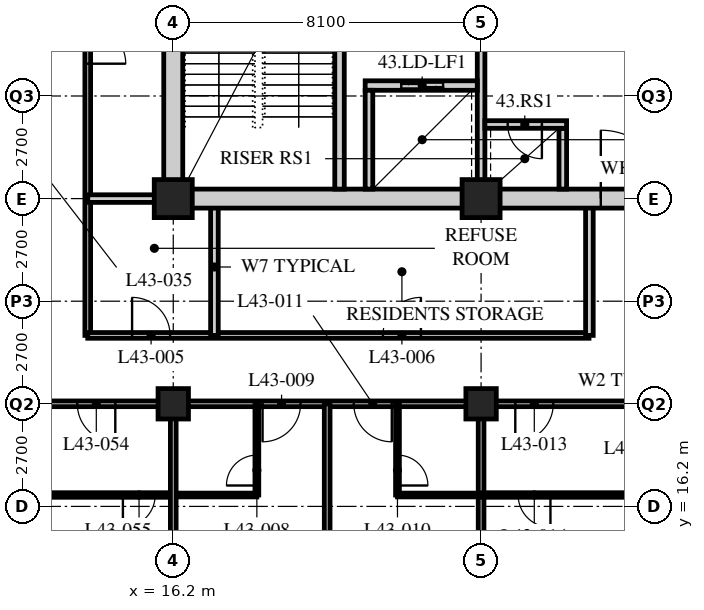
"""IFC4 building model, lengths in metres.
Left out: names, types, materials, properties, quantities, classifications, styles, units other than length and angle.
Written with IfcOpenShell. Run it as: python <this file> out.ifc"""

import sys

from ifc_helpers import new_model, si_unit, direction, frame, frame_2d, origin, origin_2d, place, context, subcontext, project, spatial, rectangle, hollow_rectangle, extrude, element, fill, save


model = new_model("IFC4")
c1 = context("Model", 3, precision=1e-05, world=origin(), true_north=direction((0.0, 1.0)))
c2 = subcontext(c1, "Body", "Model", "MODEL_VIEW")
j1 = project(units=[si_unit("LENGTHUNIT", "METRE"), si_unit("PLANEANGLEUNIT", "RADIAN")], contexts=[c1])
p1 = place(None, origin())
s1 = spatial("IfcSite", under=j1, at=p1, CompositionType="ELEMENT")
p2 = place(p1, origin())
s2 = spatial("IfcBuilding", under=s1, at=p2, CompositionType="ELEMENT")
p3 = place(p2, frame((0.0, 0.0, 170.4)))
s3 = spatial("IfcBuildingStorey", under=s2, at=p3, CompositionType="ELEMENT", Elevation=170.4)
p4 = place(p3, frame((16.2, 18.9, 0.0), z_axis=(0.0, 0.0, 1.0), x_axis=(1.0, 0.0, 0.0)))
e1 = element("IfcColumn", 1, at=p4, inside=s3, PredefinedType="COLUMN", context=c2, shape_type="SweptSolid", body=[
    extrude(hollow_rectangle(XDim=0.8, YDim=0.8, WallThickness=0.08, at=origin_2d()), origin(), (0.0, 0.0, 1.0), 3.6),
])
p5 = place(p3, frame((16.2, 24.3, 0.0), z_axis=(0.0, 0.0, 1.0), x_axis=(1.0, 0.0, 0.0)))
e2 = element("IfcColumn", 2, at=p5, inside=s3, PredefinedType="COLUMN", context=c2, shape_type="SweptSolid", body=[
    extrude(hollow_rectangle(XDim=1.0, YDim=1.0, WallThickness=0.1, at=origin_2d()), origin(), (0.0, 0.0, 1.0), 3.6),
])
p6 = place(p3, frame((24.3, 18.9, 0.0), z_axis=(0.0, 0.0, 1.0), x_axis=(1.0, 0.0, 0.0)))
e3 = element("IfcColumn", 3, at=p6, inside=s3, PredefinedType="COLUMN", context=c2, shape_type="SweptSolid", body=[
    extrude(hollow_rectangle(XDim=0.8, YDim=0.8, WallThickness=0.08, at=origin_2d()), origin(), (0.0, 0.0, 1.0), 3.6),
])
p7 = place(p3, frame((24.3, 24.3, 0.0), z_axis=(0.0, 0.0, 1.0), x_axis=(1.0, 0.0, 0.0)))
e4 = element("IfcColumn", 4, at=p7, inside=s3, PredefinedType="COLUMN", context=c2, shape_type="SweptSolid", body=[
    extrude(hollow_rectangle(XDim=1.0, YDim=1.0, WallThickness=0.1, at=origin_2d()), origin(), (0.0, 0.0, 1.0), 3.6),
])
p8 = place(p3, frame((12.15, 18.9, 0.0), z_axis=(0.0, 0.0, 1.0), x_axis=(1.0, 0.0, 0.0)))
e5 = element("IfcWall", 5, at=p8, inside=s3, PredefinedType="PARTITIONING", context=c2, shape_type="SweptSolid", body=[
    extrude(rectangle(XDim=32.4, YDim=0.15, at=frame_2d((16.2, 0.0))), origin(), (0.0, 0.0, 1.0), 2.778),
])
p9 = place(p8, frame((6.4, 0.0, 0.0)))
e6 = element("IfcOpeningElement", 6, at=p9, cuts=e5, PredefinedType="OPENING", context=c2, shape_type="SweptSolid", body=[
    extrude(rectangle(XDim=1.0, YDim=2.1, at=frame_2d((0.5, 1.05))), frame((0.0, 0.085, 0.0), z_axis=(0.0, -1.0, 0.0), x_axis=(1.0, 0.0, 0.0)), (0.0, 0.0, 1.0), 0.17),
])
p10 = place(p8, frame((8.8, 0.0, 0.0)))
e7 = element("IfcOpeningElement", 7, at=p10, cuts=e5, PredefinedType="OPENING", context=c2, shape_type="SweptSolid", body=[
    extrude(rectangle(XDim=1.0, YDim=2.1, at=frame_2d((0.5, 1.05))), frame((0.0, 0.085, 0.0), z_axis=(0.0, -1.0, 0.0), x_axis=(1.0, 0.0, 0.0)), (0.0, 0.0, 1.0), 0.17),
])
p11 = place(p8, frame((13.05, 0.0, 0.0)))
e8 = element("IfcOpeningElement", 8, at=p11, cuts=e5, PredefinedType="OPENING", context=c2, shape_type="SweptSolid", body=[
    extrude(rectangle(XDim=1.0, YDim=2.1, at=frame_2d((0.5, 1.05))), frame((0.0, 0.085, 0.0), z_axis=(0.0, -1.0, 0.0), x_axis=(1.0, 0.0, 0.0)), (0.0, 0.0, 1.0), 0.17),
])
p12 = place(p8, frame((22.6, 0.0, 0.0)))
e9 = element("IfcOpeningElement", 9, at=p12, cuts=e5, PredefinedType="OPENING", context=c2, shape_type="SweptSolid", body=[
    extrude(rectangle(XDim=1.0, YDim=2.1, at=frame_2d((0.5, 1.05))), frame((0.0, 0.085, 0.0), z_axis=(0.0, -1.0, 0.0), x_axis=(1.0, 0.0, 0.0)), (0.0, 0.0, 1.0), 0.17),
])
p13 = place(p8, frame((25.0, 0.0, 0.0)))
e10 = element("IfcOpeningElement", 10, at=p13, cuts=e5, PredefinedType="OPENING", context=c2, shape_type="SweptSolid", body=[
    extrude(rectangle(XDim=1.0, YDim=2.1, at=frame_2d((0.5, 1.05))), frame((0.0, 0.085, 0.0), z_axis=(0.0, -1.0, 0.0), x_axis=(1.0, 0.0, 0.0)), (0.0, 0.0, 1.0), 0.17),
])
p14 = place(p8, frame((1.525, 0.0, 0.0)))
e11 = element("IfcOpeningElement", 11, at=p14, cuts=e5, PredefinedType="OPENING", context=c2, shape_type="SweptSolid", body=[
    extrude(rectangle(XDim=1.0, YDim=2.1, at=frame_2d((0.5, 1.05))), frame((0.0, 0.085, 0.0), z_axis=(0.0, -1.0, 0.0), x_axis=(1.0, 0.0, 0.0)), (0.0, 0.0, 1.0), 0.17),
])
p15 = place(p8, frame((29.875, 0.0, 0.0)))
e12 = element("IfcOpeningElement", 12, at=p15, cuts=e5, PredefinedType="OPENING", context=c2, shape_type="SweptSolid", body=[
    extrude(rectangle(XDim=1.0, YDim=2.1, at=frame_2d((0.5, 1.05))), frame((0.0, 0.085, 0.0), z_axis=(0.0, -1.0, 0.0), x_axis=(1.0, 0.0, 0.0)), (0.0, 0.0, 1.0), 0.17),
])
p16 = place(p3, frame((13.95, 40.5, 0.0), z_axis=(0.0, 0.0, 1.0), x_axis=(0.0, -1.0, 0.0)))
e13 = element("IfcWall", 13, at=p16, inside=s3, PredefinedType="PARTITIONING", context=c2, shape_type="SweptSolid", body=[
    extrude(rectangle(XDim=19.8, YDim=0.15, at=frame_2d((9.9, 0.0))), origin(), (0.0, 0.0, 1.0), 3.39),
])
p17 = place(p16, frame((11.65, 0.0, 0.0)))
e14 = element("IfcOpeningElement", 14, at=p17, cuts=e13, PredefinedType="OPENING", context=c2, shape_type="SweptSolid", body=[
    extrude(rectangle(XDim=1.0, YDim=2.1, at=frame_2d((0.5, 1.05))), frame((0.0, 0.085, 0.0), z_axis=(0.0, -1.0, 0.0), x_axis=(1.0, 0.0, 0.0)), (0.0, 0.0, 1.0), 0.17),
])
p18 = place(p16, frame((3.55, 0.0, 0.0)))
e15 = element("IfcOpeningElement", 15, at=p18, cuts=e13, PredefinedType="OPENING", context=c2, shape_type="SweptSolid", body=[
    extrude(rectangle(XDim=1.0, YDim=2.1, at=frame_2d((0.5, 1.05))), frame((0.0, 0.085, 0.0), z_axis=(0.0, -1.0, 0.0), x_axis=(1.0, 0.0, 0.0)), (0.0, 0.0, 1.0), 0.17),
])
p19 = place(p3, frame((13.95, 20.7, 0.0), z_axis=(0.0, 0.0, 1.0), x_axis=(1.0, 0.0, 0.0)))
e16 = element("IfcWall", 16, at=p19, inside=s3, PredefinedType="PARTITIONING", context=c2, shape_type="SweptSolid", body=[
    extrude(rectangle(XDim=13.19, YDim=0.15, at=frame_2d((6.595, 0.0))), origin(), (0.0, 0.0, 1.0), 3.39),
])
p20 = place(p19, frame((1.167, 0.0, 0.0)))
e17 = element("IfcOpeningElement", 17, at=p20, cuts=e16, PredefinedType="OPENING", context=c2, shape_type="SweptSolid", body=[
    extrude(rectangle(XDim=1.0, YDim=2.1, at=frame_2d((0.5, 1.05))), frame((0.0, 0.085, 0.0), z_axis=(0.0, -1.0, 0.0), x_axis=(1.0, 0.0, 0.0)), (0.0, 0.0, 1.0), 0.17),
])
p21 = place(p19, frame((7.767, 0.0, 0.0)))
e18 = element("IfcOpeningElement", 18, at=p21, cuts=e16, PredefinedType="OPENING", context=c2, shape_type="SweptSolid", body=[
    extrude(rectangle(XDim=1.0, YDim=2.1, at=frame_2d((0.5, 1.05))), frame((0.0, 0.085, 0.0), z_axis=(0.0, -1.0, 0.0), x_axis=(1.0, 0.0, 0.0)), (0.0, 0.0, 1.0), 0.17),
])
for number, where, z_axis, x_axis in (
    (19, (17.283, 20.7, 0.0), (0.0, 0.0, 1.0), (0.0, 1.0, 0.0)),
    (20, (27.15, 20.7, 0.0), (0.0, 0.0, 1.0), (0.0, 1.0, 0.0)),
):
    element("IfcWall", number, at=place(p3, frame(where, z_axis=z_axis, x_axis=x_axis)), inside=s3, PredefinedType="SOLIDWALL", context=c2, shape_type="SweptSolid", body=[
        extrude(rectangle(XDim=3.6, YDim=0.2, at=frame_2d((1.8, 0.0))), origin(), (0.0, 0.0, 1.0), 3.39),
    ])
p22 = place(p3, frame((13.95, 24.3, 0.0), z_axis=(0.0, 0.0, 1.0), x_axis=(1.0, 0.0, 0.0)))
e21 = element("IfcWall", 21, at=p22, inside=s3, PredefinedType="SOLIDWALL", context=c2, shape_type="SweptSolid", body=[
    extrude(rectangle(XDim=2.25, YDim=0.2, at=frame_2d((1.125, 0.0))), origin(), (0.0, 0.0, 1.0), 3.39),
])
p23 = place(p3, frame((16.2, 16.5, 0.0), z_axis=(0.0, 0.0, 1.0), x_axis=(1.0, 0.0, 0.0)))
e22 = element("IfcWall", 22, at=p23, inside=s3, PredefinedType="PARTITIONING", context=c2, shape_type="SweptSolid", body=[
    extrude(rectangle(XDim=2.2, YDim=0.1, at=frame_2d((1.1, 0.0))), origin(), (0.0, 0.0, 1.0), 3.39),
])
p24 = place(p3, frame((18.4, 18.9, 0.0), z_axis=(0.0, 0.0, 1.0), x_axis=(0.0, -1.0, 0.0)))
e23 = element("IfcWall", 23, at=p24, inside=s3, PredefinedType="PARTITIONING", context=c2, shape_type="SweptSolid", body=[
    extrude(rectangle(XDim=2.4, YDim=0.1, at=frame_2d((1.2, 0.0))), origin(), (0.0, 0.0, 1.0), 3.39),
])
p25 = place(p24, frame((1.35, 0.0, 0.0)))
e24 = element("IfcOpeningElement", 24, at=p25, cuts=e23, PredefinedType="OPENING", context=c2, shape_type="SweptSolid", body=[
    extrude(rectangle(XDim=0.8, YDim=2.1, at=frame_2d((0.4, 1.05))), frame((0.0, 0.06, 0.0), z_axis=(0.0, -1.0, 0.0), x_axis=(1.0, 0.0, 0.0)), (0.0, 0.0, 1.0), 0.12),
])
p26 = place(p3, frame((20.25, 18.9, 0.0), z_axis=(0.0, 0.0, 1.0), x_axis=(0.0, -1.0, 0.0)))
e25 = element("IfcWall", 25, at=p26, inside=s3, PredefinedType="PARTITIONING", context=c2, shape_type="SweptSolid", body=[
    extrude(rectangle(XDim=7.8, YDim=0.15, at=frame_2d((3.9, 0.0))), origin(), (0.0, 0.0, 1.0), 3.39),
])
p27 = place(p3, frame((22.1, 16.5, 0.0), z_axis=(0.0, 0.0, 1.0), x_axis=(1.0, 0.0, 0.0)))
e26 = element("IfcWall", 26, at=p27, inside=s3, PredefinedType="PARTITIONING", context=c2, shape_type="SweptSolid", body=[
    extrude(rectangle(XDim=2.2, YDim=0.1, at=frame_2d((1.1, 0.0))), origin(), (0.0, 0.0, 1.0), 3.39),
])
p28 = place(p3, frame((22.1, 18.9, 0.0), z_axis=(0.0, 0.0, 1.0), x_axis=(0.0, -1.0, 0.0)))
e27 = element("IfcWall", 27, at=p28, inside=s3, PredefinedType="PARTITIONING", context=c2, shape_type="SweptSolid", body=[
    extrude(rectangle(XDim=2.4, YDim=0.1, at=frame_2d((1.2, 0.0))), origin(), (0.0, 0.0, 1.0), 3.39),
])
p29 = place(p28, frame((1.35, 0.0, 0.0)))
e28 = element("IfcOpeningElement", 28, at=p29, cuts=e27, PredefinedType="OPENING", context=c2, shape_type="SweptSolid", body=[
    extrude(rectangle(XDim=0.8, YDim=2.1, at=frame_2d((0.4, 1.05))), frame((0.0, 0.06, 0.0), z_axis=(0.0, -1.0, 0.0), x_axis=(1.0, 0.0, 0.0)), (0.0, 0.0, 1.0), 0.12),
])
p30 = place(p3, frame((24.3, 18.9, 0.0), z_axis=(0.0, 0.0, 1.0), x_axis=(0.0, -1.0, 0.0)))
e29 = element("IfcWall", 29, at=p30, inside=s3, PredefinedType="PARTITIONING", context=c2, shape_type="SweptSolid", body=[
    extrude(rectangle(XDim=7.8, YDim=0.15, at=frame_2d((3.9, 0.0))), origin(), (0.0, 0.0, 1.0), 2.778),
])
p31 = place(p3, frame((24.3, 16.5, 0.0), z_axis=(0.0, 0.0, 1.0), x_axis=(1.0, 0.0, 0.0)))
e30 = element("IfcWall", 30, at=p31, inside=s3, PredefinedType="PARTITIONING", context=c2, shape_type="SweptSolid", body=[
    extrude(rectangle(XDim=8.1, YDim=0.12, at=frame_2d((4.05, 0.0))), origin(), (0.0, 0.0, 1.0), 3.39),
])
p32 = place(p31, frame((0.975, 0.0, 0.0)))
e31 = element("IfcOpeningElement", 31, at=p32, cuts=e30, PredefinedType="OPENING", context=c2, shape_type="SweptSolid", body=[
    extrude(rectangle(XDim=0.85, YDim=2.1, at=frame_2d((0.425, 1.05))), frame((0.0, 0.07, 0.0), z_axis=(0.0, -1.0, 0.0), x_axis=(1.0, 0.0, 0.0)), (0.0, 0.0, 1.0), 0.14),
])
p33 = place(p31, frame((4.375, 0.0, 0.0)))
e32 = element("IfcOpeningElement", 32, at=p33, cuts=e30, PredefinedType="OPENING", context=c2, shape_type="SweptSolid", body=[
    extrude(rectangle(XDim=0.85, YDim=2.1, at=frame_2d((0.425, 1.05))), frame((0.0, 0.07, 0.0), z_axis=(0.0, -1.0, 0.0), x_axis=(1.0, 0.0, 0.0)), (0.0, 0.0, 1.0), 0.14),
])
p34 = place(p3, frame((8.15, 16.5, 0.0), z_axis=(0.0, 0.0, 1.0), x_axis=(1.0, 0.0, 0.0)))
e33 = element("IfcWall", 33, at=p34, inside=s3, PredefinedType="PARTITIONING", context=c2, shape_type="SweptSolid", body=[
    extrude(rectangle(XDim=8.05, YDim=0.12, at=frame_2d((4.025, 0.0))), origin(), (0.0, 0.0, 1.0), 3.39),
])
p35 = place(p34, frame((6.725, 0.0, 0.0)))
e34 = element("IfcOpeningElement", 34, at=p35, cuts=e33, PredefinedType="OPENING", context=c2, shape_type="SweptSolid", body=[
    extrude(rectangle(XDim=0.85, YDim=2.1, at=frame_2d((0.425, 1.05))), frame((0.0, 0.07, 0.0), z_axis=(0.0, -1.0, 0.0), x_axis=(1.0, 0.0, 0.0)), (0.0, 0.0, 1.0), 0.14),
])
p36 = place(p34, frame((2.875, 0.0, 0.0)))
e35 = element("IfcOpeningElement", 35, at=p36, cuts=e33, PredefinedType="OPENING", context=c2, shape_type="SweptSolid", body=[
    extrude(rectangle(XDim=0.85, YDim=2.1, at=frame_2d((0.425, 1.05))), frame((0.0, 0.07, 0.0), z_axis=(0.0, -1.0, 0.0), x_axis=(1.0, 0.0, 0.0)), (0.0, 0.0, 1.0), 0.14),
])
p37 = place(p3, frame((16.2, 18.9, 0.0), z_axis=(0.0, 0.0, 1.0), x_axis=(0.0, -1.0, 0.0)))
e36 = element("IfcWall", 36, at=p37, inside=s3, PredefinedType="PARTITIONING", context=c2, shape_type="SweptSolid", body=[
    extrude(rectangle(XDim=7.8, YDim=0.15, at=frame_2d((3.9, 0.0))), origin(), (0.0, 0.0, 1.0), 2.778),
])
p38 = place(p3, frame((15.95, 24.3, 0.0), z_axis=(0.0, 0.0, 1.0), x_axis=(1.0, 0.0, 0.0)))
e37 = element("IfcWall", 37, at=p38, inside=s3, PredefinedType="SOLIDWALL", context=c2, shape_type="SweptSolid", body=[
    extrude(rectangle(XDim=24.8, YDim=0.5, at=frame_2d((12.4, 0.0))), origin(), (0.0, 0.0, 1.0), 2.74),
])
p39 = place(p38, frame((11.5, 0.0, 0.0)))
e38 = element("IfcOpeningElement", 38, at=p39, cuts=e37, PredefinedType="OPENING", context=c2, shape_type="SweptSolid", body=[
    extrude(rectangle(XDim=1.8, YDim=2.4, at=frame_2d((0.9, 1.2))), frame((0.0, 0.26, 0.0), z_axis=(0.0, -1.0, 0.0), x_axis=(1.0, 0.0, 0.0)), (0.0, 0.0, 1.0), 0.52),
])
p40 = place(p3, frame((16.2, 24.55, 0.0), z_axis=(0.0, 0.0, 1.0), x_axis=(0.0, 1.0, 0.0)))
e39 = element("IfcWall", 39, at=p40, inside=s3, PredefinedType="SOLIDWALL", context=c2, shape_type="SweptSolid", body=[
    extrude(rectangle(XDim=15.7, YDim=0.5, at=frame_2d((7.85, 0.0))), origin(), (0.0, 0.0, 1.0), 2.778),
])
p41 = place(p3, frame((24.3, 24.55, 0.0), z_axis=(0.0, 0.0, 1.0), x_axis=(0.0, 1.0, 0.0)))
e40 = element("IfcWall", 40, at=p41, inside=s3, PredefinedType="SOLIDWALL", context=c2, shape_type="SweptSolid", body=[
    extrude(rectangle(XDim=7.75, YDim=0.2, at=frame_2d((3.875, 0.0))), origin(), (0.0, 0.0, 1.0), 2.778),
])
p42 = place(p41, frame((4.6, 0.0, 0.0)))
e41 = element("IfcOpeningElement", 41, at=p42, cuts=e40, PredefinedType="OPENING", context=c2, shape_type="SweptSolid", body=[
    extrude(rectangle(XDim=1.2, YDim=2.1, at=frame_2d((0.6, 1.05))), frame((0.0, 0.11, 0.0), z_axis=(0.0, -1.0, 0.0), x_axis=(1.0, 0.0, 0.0)), (0.0, 0.0, 1.0), 0.22),
])
p43 = place(p3, frame((20.575, 24.55, 0.0), z_axis=(0.0, 0.0, 1.0), x_axis=(0.0, 1.0, 0.0)))
e42 = element("IfcWall", 42, at=p43, inside=s3, PredefinedType="SOLIDWALL", context=c2, shape_type="SweptSolid", body=[
    extrude(rectangle(XDim=7.75, YDim=0.25, at=frame_2d((3.875, 0.0))), origin(), (0.0, 0.0, 1.0), 3.39),
])
p44 = place(p43, frame((6.2, 0.0, 0.0)))
e43 = element("IfcOpeningElement", 43, at=p44, cuts=e42, PredefinedType="OPENING", context=c2, shape_type="SweptSolid", body=[
    extrude(rectangle(XDim=1.2, YDim=2.1, at=frame_2d((0.6, 1.05))), frame((0.0, 0.135, 0.0), z_axis=(0.0, -1.0, 0.0), x_axis=(1.0, 0.0, 0.0)), (0.0, 0.0, 1.0), 0.27),
])
p45 = place(p3, frame((21.25, 27.275, 0.0), z_axis=(0.0, 0.0, 1.0), x_axis=(1.0, 0.0, 0.0)))
e44 = element("IfcWall", 44, at=p45, inside=s3, PredefinedType="SOLIDWALL", context=c2, shape_type="SweptSolid", body=[
    extrude(rectangle(XDim=2.95, YDim=0.25, at=frame_2d((1.475, 0.0))), origin(), (0.0, 0.0, 1.0), 3.39),
])
p46 = place(p45, frame((0.95, 0.0, 0.0)))
e45 = element("IfcOpeningElement", 45, at=p46, cuts=e44, PredefinedType="OPENING", context=c2, shape_type="SweptSolid", body=[
    extrude(rectangle(XDim=1.1, YDim=2.4, at=frame_2d((0.55, 1.2))), frame((0.0, 0.135, 0.0), z_axis=(0.0, -1.0, 0.0), x_axis=(1.0, 0.0, 0.0)), (0.0, 0.0, 1.0), 0.27),
])
p47 = place(p3, frame((21.35, 24.55, 0.0), z_axis=(0.0, 0.0, 1.0), x_axis=(0.0, 1.0, 0.0)))
e46 = element("IfcWall", 46, at=p47, inside=s3, PredefinedType="SOLIDWALL", context=c2, shape_type="SweptSolid", body=[
    extrude(rectangle(XDim=2.6, YDim=0.2, at=frame_2d((1.3, 0.0))), origin(), (0.0, 0.0, 1.0), 3.39),
])
p48 = place(p3, frame((26.45, 24.55, 0.0), z_axis=(0.0, 0.0, 1.0), x_axis=(0.0, 1.0, 0.0)))
e47 = element("IfcWall", 47, at=p48, inside=s3, PredefinedType="SOLIDWALL", context=c2, shape_type="SweptSolid", body=[
    extrude(rectangle(XDim=1.6, YDim=0.2, at=frame_2d((0.8, 0.0))), origin(), (0.0, 0.0, 1.0), 3.39),
])
p49 = place(p3, frame((24.4, 26.25, 0.0), z_axis=(0.0, 0.0, 1.0), x_axis=(1.0, 0.0, 0.0)))
e48 = element("IfcWall", 48, at=p49, inside=s3, PredefinedType="SOLIDWALL", context=c2, shape_type="SweptSolid", body=[
    extrude(rectangle(XDim=2.15, YDim=0.2, at=frame_2d((1.075, 0.0))), origin(), (0.0, 0.0, 1.0), 3.39),
])
p50 = place(p49, frame((0.6, 0.0, 0.0)))
e49 = element("IfcOpeningElement", 49, at=p50, cuts=e48, PredefinedType="OPENING", context=c2, shape_type="SweptSolid", body=[
    extrude(rectangle(XDim=0.9, YDim=2.1, at=frame_2d((0.45, 1.05))), frame((0.0, 0.11, 0.0), z_axis=(0.0, -1.0, 0.0), x_axis=(1.0, 0.0, 0.0)), (0.0, 0.0, 1.0), 0.22),
])
p51 = place(p17, origin())
e50 = element("IfcDoor", 50, at=p51, inside=s3, OperationType="SINGLE_SWING_RIGHT", PredefinedType="DOOR", context=c2, shape_type="SweptSolid", body=[
    extrude(rectangle(XDim=1.0, YDim=2.1, at=frame_2d((0.5, 1.05))), frame((0.0, 0.025, 0.0), z_axis=(0.0, -1.0, 0.0), x_axis=(1.0, 0.0, 0.0)), (0.0, 0.0, 1.0), 0.05),
])
fill(e14, e50)
p52 = place(p20, origin())
e51 = element("IfcDoor", 51, at=p52, inside=s3, OperationType="SINGLE_SWING_LEFT", PredefinedType="DOOR", context=c2, shape_type="SweptSolid", body=[
    extrude(rectangle(XDim=1.0, YDim=2.1, at=frame_2d((0.5, 1.05))), frame((0.0, 0.025, 0.0), z_axis=(0.0, -1.0, 0.0), x_axis=(1.0, 0.0, 0.0)), (0.0, 0.0, 1.0), 0.05),
])
fill(e17, e51)
p53 = place(p21, origin())
e52 = element("IfcDoor", 52, at=p53, inside=s3, OperationType="SINGLE_SWING_RIGHT", PredefinedType="DOOR", context=c2, shape_type="SweptSolid", body=[
    extrude(rectangle(XDim=1.0, YDim=2.1, at=frame_2d((0.5, 1.05))), frame((0.0, 0.025, 0.0), z_axis=(0.0, -1.0, 0.0), x_axis=(1.0, 0.0, 0.0)), (0.0, 0.0, 1.0), 0.05),
])
fill(e18, e52)
p54 = place(p25, origin())
e53 = element("IfcDoor", 53, at=p54, inside=s3, OperationType="SINGLE_SWING_LEFT", PredefinedType="DOOR", context=c2, shape_type="SweptSolid", body=[
    extrude(rectangle(XDim=0.8, YDim=2.1, at=frame_2d((0.4, 1.05))), frame((0.0, 0.025, 0.0), z_axis=(0.0, -1.0, 0.0), x_axis=(1.0, 0.0, 0.0)), (0.0, 0.0, 1.0), 0.05),
])
fill(e24, e53)
p55 = place(p9, origin())
e54 = element("IfcDoor", 54, at=p55, inside=s3, OperationType="SINGLE_SWING_RIGHT", PredefinedType="DOOR", context=c2, shape_type="SweptSolid", body=[
    extrude(rectangle(XDim=1.0, YDim=2.1, at=frame_2d((0.5, 1.05))), frame((0.0, 0.025, 0.0), z_axis=(0.0, -1.0, 0.0), x_axis=(1.0, 0.0, 0.0)), (0.0, 0.0, 1.0), 0.05),
])
fill(e6, e54)
p56 = place(p29, origin())
e55 = element("IfcDoor", 55, at=p56, inside=s3, OperationType="SINGLE_SWING_RIGHT", PredefinedType="DOOR", context=c2, shape_type="SweptSolid", body=[
    extrude(rectangle(XDim=0.8, YDim=2.1, at=frame_2d((0.4, 1.05))), frame((0.0, 0.025, 0.0), z_axis=(0.0, -1.0, 0.0), x_axis=(1.0, 0.0, 0.0)), (0.0, 0.0, 1.0), 0.05),
])
fill(e28, e55)
p57 = place(p10, origin())
e56 = element("IfcDoor", 56, at=p57, inside=s3, OperationType="SINGLE_SWING_LEFT", PredefinedType="DOOR", context=c2, shape_type="SweptSolid", body=[
    extrude(rectangle(XDim=1.0, YDim=2.1, at=frame_2d((0.5, 1.05))), frame((0.0, 0.025, 0.0), z_axis=(0.0, -1.0, 0.0), x_axis=(1.0, 0.0, 0.0)), (0.0, 0.0, 1.0), 0.05),
])
fill(e7, e56)
p58 = place(p11, origin())
e57 = element("IfcDoor", 57, at=p58, inside=s3, OperationType="SINGLE_SWING_RIGHT", PredefinedType="DOOR", context=c2, shape_type="SweptSolid", body=[
    extrude(rectangle(XDim=1.0, YDim=2.1, at=frame_2d((0.5, 1.05))), frame((0.0, 0.025, 0.0), z_axis=(0.0, -1.0, 0.0), x_axis=(1.0, 0.0, 0.0)), (0.0, 0.0, 1.0), 0.05),
])
fill(e8, e57)
p59 = place(p32, origin())
e58 = element("IfcDoor", 58, at=p59, inside=s3, OperationType="SINGLE_SWING_LEFT", PredefinedType="DOOR", context=c2, shape_type="SweptSolid", body=[
    extrude(rectangle(XDim=0.85, YDim=2.1, at=frame_2d((0.425, 1.05))), frame((0.0, 0.025, 0.0), z_axis=(0.0, -1.0, 0.0), x_axis=(1.0, 0.0, 0.0)), (0.0, 0.0, 1.0), 0.05),
])
fill(e31, e58)
p60 = place(p14, origin())
e59 = element("IfcDoor", 59, at=p60, inside=s3, OperationType="SINGLE_SWING_LEFT", PredefinedType="DOOR", context=c2, shape_type="SweptSolid", body=[
    extrude(rectangle(XDim=1.0, YDim=2.1, at=frame_2d((0.5, 1.05))), frame((0.0, 0.025, 0.0), z_axis=(0.0, -1.0, 0.0), x_axis=(1.0, 0.0, 0.0)), (0.0, 0.0, 1.0), 0.05),
])
fill(e11, e59)
p61 = place(p35, origin())
e60 = element("IfcDoor", 60, at=p61, inside=s3, OperationType="SINGLE_SWING_RIGHT", PredefinedType="DOOR", context=c2, shape_type="SweptSolid", body=[
    extrude(rectangle(XDim=0.85, YDim=2.1, at=frame_2d((0.425, 1.05))), frame((0.0, 0.025, 0.0), z_axis=(0.0, -1.0, 0.0), x_axis=(1.0, 0.0, 0.0)), (0.0, 0.0, 1.0), 0.05),
])
fill(e34, e60)
p62 = place(p50, origin())
e61 = element("IfcDoor", 61, at=p62, inside=s3, OperationType="SINGLE_SWING_LEFT", PredefinedType="DOOR", context=c2, shape_type="SweptSolid", body=[
    extrude(rectangle(XDim=0.9, YDim=2.1, at=frame_2d((0.45, 1.05))), frame((0.0, 0.025, 0.0), z_axis=(0.0, -1.0, 0.0), x_axis=(1.0, 0.0, 0.0)), (0.0, 0.0, 1.0), 0.05),
])
fill(e49, e61)
p63 = place(p46, origin())
e62 = element("IfcDoor", 62, at=p63, inside=s3, OperationType="DOUBLE_DOOR_SLIDING", PredefinedType="DOOR", context=c2, shape_type="SweptSolid", body=[
    extrude(rectangle(XDim=1.1, YDim=2.4, at=frame_2d((0.55, 1.2))), frame((0.0, 0.025, 0.0), z_axis=(0.0, -1.0, 0.0), x_axis=(1.0, 0.0, 0.0)), (0.0, 0.0, 1.0), 0.05),
])
fill(e45, e62)
p64 = place(p39, origin())
e63 = element("IfcDoor", 63, at=p64, inside=s3, OperationType="DOUBLE_DOOR_SINGLE_SWING", PredefinedType="DOOR", context=c2, shape_type="SweptSolid", body=[
    extrude(rectangle(XDim=1.8, YDim=2.4, at=frame_2d((0.9, 1.2))), frame((0.0, 0.025, 0.0), z_axis=(0.0, -1.0, 0.0), x_axis=(1.0, 0.0, 0.0)), (0.0, 0.0, 1.0), 0.05),
])
fill(e38, e63)
save(model, sys.argv[1])
